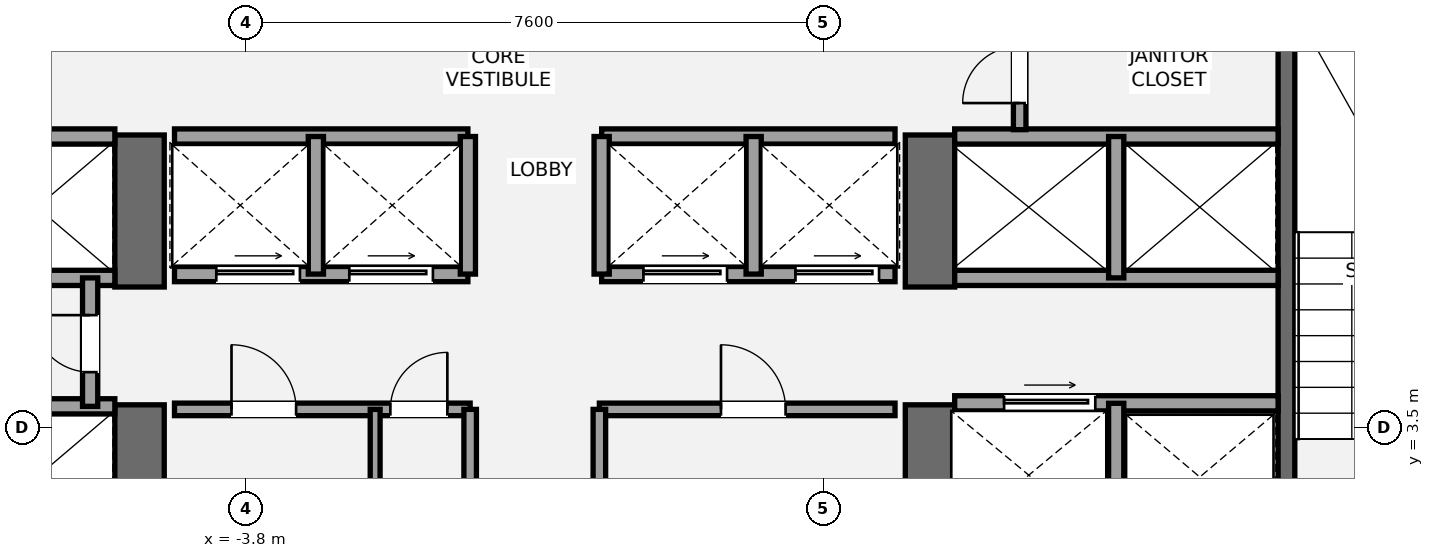
"""IFC4 building model, lengths in metres.
Left out: names, types, materials, properties, quantities, classifications, styles, units other than length and angle.
Written with IfcOpenShell. Run it as: python <this file> out.ifc"""

import sys

from ifc_helpers import new_model, si_unit, direction, frame, frame_2d, origin, place, context, subcontext, project, spatial, rectangle, extrude, element, fill, save


model = new_model("IFC4")
c1 = context("Model", 3, precision=1e-05, world=origin(), true_north=direction((0.0, 1.0)))
c2 = subcontext(c1, "Body", "Model", "MODEL_VIEW")
j1 = project(units=[si_unit("LENGTHUNIT", "METRE"), si_unit("PLANEANGLEUNIT", "RADIAN")], contexts=[c1])
p1 = place(None, origin())
s1 = spatial("IfcSite", under=j1, at=p1, CompositionType="ELEMENT")
p2 = place(p1, origin())
s2 = spatial("IfcBuilding", under=s1, at=p2, CompositionType="ELEMENT")
p3 = place(p2, frame((0.0, 0.0, 185.4)))
s3 = spatial("IfcBuildingStorey", under=s2, at=p3, CompositionType="ELEMENT", Elevation=185.4)
p4 = place(p3, frame((-5.2, 1.2, 0.0), z_axis=(0.0, 0.0, 1.0), x_axis=(0.0, 1.0, 0.0)))
e1 = element("IfcWall", 1, at=p4, inside=s3, PredefinedType="SHEAR", context=c2, shape_type="SweptSolid", body=[
    extrude(rectangle(XDim=2.6, YDim=0.65, at=frame_2d((1.3, 0.0))), origin(), (0.0, 0.0, 1.0), 3.2),
])
p5 = place(p3, frame((-5.2, 5.35, 0.0), z_axis=(0.0, 0.0, 1.0), x_axis=(0.0, 1.0, 0.0)))
e2 = element("IfcWall", 2, at=p5, inside=s3, PredefinedType="SHEAR", context=c2, shape_type="SweptSolid", body=[
    extrude(rectangle(XDim=2.0, YDim=0.65, at=frame_2d((1.0, 0.0))), origin(), (0.0, 0.0, 1.0), 3.2),
])
p6 = place(p3, frame((5.2, 1.2, 0.0), z_axis=(0.0, 0.0, 1.0), x_axis=(0.0, 1.0, 0.0)))
e3 = element("IfcWall", 3, at=p6, inside=s3, PredefinedType="SHEAR", context=c2, shape_type="SweptSolid", body=[
    extrude(rectangle(XDim=2.6, YDim=0.65, at=frame_2d((1.3, 0.0))), origin(), (0.0, 0.0, 1.0), 3.2),
])
p7 = place(p3, frame((5.2, 5.35, 0.0), z_axis=(0.0, 0.0, 1.0), x_axis=(0.0, 1.0, 0.0)))
e4 = element("IfcWall", 4, at=p7, inside=s3, PredefinedType="SHEAR", context=c2, shape_type="SweptSolid", body=[
    extrude(rectangle(XDim=2.0, YDim=0.65, at=frame_2d((1.0, 0.0))), origin(), (0.0, 0.0, 1.0), 3.2),
])
p8 = place(p3, frame((9.89, 1.85, 0.0), z_axis=(0.0, 0.0, 1.0), x_axis=(0.0, 1.0, 0.0)))
e5 = element("IfcWall", 5, at=p8, inside=s3, PredefinedType="SHEAR", context=c2, shape_type="SweptSolid", body=[
    extrude(rectangle(XDim=7.15, YDim=0.22, at=frame_2d((3.575, 0.0))), origin(), (0.0, 0.0, 1.0), 3.2),
])
for number, where, z_axis, x_axis in (
    (6, (-9.78, 3.78, 0.0), (0.0, 0.0, 1.0), (1.0, 0.0, 0.0)),
    (7, (-9.78, 5.47, 0.0), (0.0, 0.0, 1.0), (1.0, 0.0, 0.0)),
    (8, (-9.78, 7.33, 0.0), (0.0, 0.0, 1.0), (1.0, 0.0, 0.0)),
):
    element("IfcWall", number, at=place(p3, frame(where, z_axis=z_axis, x_axis=x_axis)), inside=s3, PredefinedType="SOLIDWALL", context=c2, shape_type="SweptSolid", body=[
        extrude(rectangle(XDim=4.255, YDim=0.2, at=frame_2d((2.127, 0.0))), origin(), (0.0, 0.0, 1.0), 3.02),
    ])
p9 = place(p3, frame((-5.85, 3.78, 0.0), z_axis=(0.0, 0.0, 1.0), x_axis=(0.0, 1.0, 0.0)))
e9 = element("IfcWall", 9, at=p9, inside=s3, PredefinedType="SOLIDWALL", context=c2, shape_type="SweptSolid", body=[
    extrude(rectangle(XDim=1.69, YDim=0.2, at=frame_2d((0.845, 0.0))), origin(), (0.0, 0.0, 1.0), 3.02),
])
p10 = place(p9, frame((0.45, 0.0, 0.0)))
e10 = element("IfcOpeningElement", 10, at=p10, cuts=e9, PredefinedType="OPENING", context=c2, shape_type="SweptSolid", body=[
    extrude(rectangle(XDim=0.75, YDim=2.1, at=frame_2d((0.375, 1.05))), frame((0.0, 0.11, 0.0), z_axis=(0.0, -1.0, 0.0), x_axis=(1.0, 0.0, 0.0)), (0.0, 0.0, 1.0), 0.22),
])
p11 = place(p3, frame((5.525, 3.82, 0.0), z_axis=(0.0, 0.0, 1.0), x_axis=(1.0, 0.0, 0.0)))
e11 = element("IfcWall", 11, at=p11, inside=s3, PredefinedType="SOLIDWALL", context=c2, shape_type="SweptSolid", body=[
    extrude(rectangle(XDim=4.255, YDim=0.2, at=frame_2d((2.127, 0.0))), origin(), (0.0, 0.0, 1.0), 3.02),
])
p12 = place(p11, frame((0.65, 0.0, 0.0)))
e12 = element("IfcOpeningElement", 12, at=p12, cuts=e11, PredefinedType="OPENING", context=c2, shape_type="SweptSolid", body=[
    extrude(rectangle(XDim=1.2, YDim=2.2, at=frame_2d((0.6, 1.1))), frame((0.0, 0.11, 0.0), z_axis=(0.0, -1.0, 0.0), x_axis=(1.0, 0.0, 0.0)), (0.0, 0.0, 1.0), 0.22),
])
p13 = place(p3, frame((7.65, 1.85, 0.0), z_axis=(0.0, 0.0, 1.0), x_axis=(0.0, 1.0, 0.0)))
e13 = element("IfcWall", 13, at=p13, inside=s3, PredefinedType="SOLIDWALL", context=c2, shape_type="SweptSolid", body=[
    extrude(rectangle(XDim=1.97, YDim=0.2, at=frame_2d((0.985, 0.0))), origin(), (0.0, 0.0, 1.0), 3.02),
])
for number, where, z_axis, x_axis in (
    (14, (5.525, 5.47, 0.0), (0.0, 0.0, 1.0), (1.0, 0.0, 0.0)),
    (15, (5.525, 7.33, 0.0), (0.0, 0.0, 1.0), (1.0, 0.0, 0.0)),
):
    element("IfcWall", number, at=place(p3, frame(where, z_axis=z_axis, x_axis=x_axis)), inside=s3, PredefinedType="SOLIDWALL", context=c2, shape_type="SweptSolid", body=[
        extrude(rectangle(XDim=4.255, YDim=0.2, at=frame_2d((2.127, 0.0))), origin(), (0.0, 0.0, 1.0), 3.02),
    ])
p14 = place(p3, frame((7.65, 5.47, 0.0), z_axis=(0.0, 0.0, 1.0), x_axis=(0.0, 1.0, 0.0)))
e16 = element("IfcWall", 16, at=p14, inside=s3, PredefinedType="SOLIDWALL", context=c2, shape_type="SweptSolid", body=[
    extrude(rectangle(XDim=1.86, YDim=0.2, at=frame_2d((0.93, 0.0))), origin(), (0.0, 0.0, 1.0), 3.02),
])
p15 = place(p3, frame((-4.74, 3.74, 0.0), z_axis=(0.0, 0.0, 1.0), x_axis=(1.0, 0.0, 0.0)))
e17 = element("IfcWall", 17, at=p15, inside=s3, PredefinedType="PARTITIONING", context=c2, shape_type="SweptSolid", body=[
    extrude(rectangle(XDim=3.89, YDim=0.165, at=frame_2d((1.945, 0.0))), origin(), (0.0, 0.0, 1.0), 3.02),
])
p16 = place(p15, frame((0.75, 0.0, 0.0)))
e18 = element("IfcOpeningElement", 18, at=p16, cuts=e17, PredefinedType="OPENING", context=c2, shape_type="SweptSolid", body=[
    extrude(rectangle(XDim=0.85, YDim=2.1, at=frame_2d((0.425, 1.05))), frame((0.0, 0.093, 0.0), z_axis=(0.0, -1.0, 0.0), x_axis=(1.0, 0.0, 0.0)), (0.0, 0.0, 1.0), 0.185),
])
p17 = place(p15, frame((2.84, 0.0, 0.0)))
e19 = element("IfcOpeningElement", 19, at=p17, cuts=e17, PredefinedType="OPENING", context=c2, shape_type="SweptSolid", body=[
    extrude(rectangle(XDim=0.75, YDim=2.1, at=frame_2d((0.375, 1.05))), frame((0.0, 0.093, 0.0), z_axis=(0.0, -1.0, 0.0), x_axis=(1.0, 0.0, 0.0)), (0.0, 0.0, 1.0), 0.185),
])
p18 = place(p3, frame((-0.85, 1.92, 0.0), z_axis=(0.0, 0.0, 1.0), x_axis=(0.0, 1.0, 0.0)))
e20 = element("IfcWall", 20, at=p18, inside=s3, PredefinedType="PARTITIONING", context=c2, shape_type="SweptSolid", body=[
    extrude(rectangle(XDim=1.82, YDim=0.165, at=frame_2d((0.91, 0.0))), origin(), (0.0, 0.0, 1.0), 3.02),
])
p19 = place(p3, frame((0.85, 3.74, 0.0), z_axis=(0.0, 0.0, 1.0), x_axis=(1.0, 0.0, 0.0)))
e21 = element("IfcWall", 21, at=p19, inside=s3, PredefinedType="PARTITIONING", context=c2, shape_type="SweptSolid", body=[
    extrude(rectangle(XDim=3.89, YDim=0.165, at=frame_2d((1.945, 0.0))), origin(), (0.0, 0.0, 1.0), 3.02),
])
p20 = place(p19, frame((1.6, 0.0, 0.0)))
e22 = element("IfcOpeningElement", 22, at=p20, cuts=e21, PredefinedType="OPENING", context=c2, shape_type="SweptSolid", body=[
    extrude(rectangle(XDim=0.85, YDim=2.1, at=frame_2d((0.425, 1.05))), frame((0.0, 0.093, 0.0), z_axis=(0.0, -1.0, 0.0), x_axis=(1.0, 0.0, 0.0)), (0.0, 0.0, 1.0), 0.185),
])
p21 = place(p3, frame((0.85, 1.92, 0.0), z_axis=(0.0, 0.0, 1.0), x_axis=(0.0, 1.0, 0.0)))
e23 = element("IfcWall", 23, at=p21, inside=s3, PredefinedType="PARTITIONING", context=c2, shape_type="SweptSolid", body=[
    extrude(rectangle(XDim=1.82, YDim=0.165, at=frame_2d((0.91, 0.0))), origin(), (0.0, 0.0, 1.0), 3.02),
])
p22 = place(p3, frame((-2.1, 1.92, 0.0), z_axis=(0.0, 0.0, 1.0), x_axis=(0.0, 1.0, 0.0)))
e24 = element("IfcWall", 24, at=p22, inside=s3, PredefinedType="PARTITIONING", context=c2, shape_type="SweptSolid", body=[
    extrude(rectangle(XDim=1.82, YDim=0.13, at=frame_2d((0.91, 0.0))), origin(), (0.0, 0.0, 1.0), 3.02),
])
p23 = place(p3, frame((-4.74, 5.52, 0.0), z_axis=(0.0, 0.0, 1.0), x_axis=(1.0, 0.0, 0.0)))
e25 = element("IfcWall", 25, at=p23, inside=s3, PredefinedType="SOLIDWALL", context=c2, shape_type="SweptSolid", body=[
    extrude(rectangle(XDim=3.86, YDim=0.2, at=frame_2d((1.93, 0.0))), origin(), (0.0, 0.0, 1.0), 3.02),
])
p24 = place(p23, frame((0.55, 0.0, 0.0)))
e26 = element("IfcOpeningElement", 26, at=p24, cuts=e25, PredefinedType="OPENING", context=c2, shape_type="SweptSolid", body=[
    extrude(rectangle(XDim=1.1, YDim=2.2, at=frame_2d((0.55, 1.1))), frame((0.0, 0.11, 0.0), z_axis=(0.0, -1.0, 0.0), x_axis=(1.0, 0.0, 0.0)), (0.0, 0.0, 1.0), 0.22),
])
p25 = place(p23, frame((2.3, 0.0, 0.0)))
e27 = element("IfcOpeningElement", 27, at=p25, cuts=e25, PredefinedType="OPENING", context=c2, shape_type="SweptSolid", body=[
    extrude(rectangle(XDim=1.1, YDim=2.2, at=frame_2d((0.55, 1.1))), frame((0.0, 0.11, 0.0), z_axis=(0.0, -1.0, 0.0), x_axis=(1.0, 0.0, 0.0)), (0.0, 0.0, 1.0), 0.22),
])
p26 = place(p3, frame((0.88, 5.52, 0.0), z_axis=(0.0, 0.0, 1.0), x_axis=(1.0, 0.0, 0.0)))
e28 = element("IfcWall", 28, at=p26, inside=s3, PredefinedType="SOLIDWALL", context=c2, shape_type="SweptSolid", body=[
    extrude(rectangle(XDim=3.86, YDim=0.2, at=frame_2d((1.93, 0.0))), origin(), (0.0, 0.0, 1.0), 3.02),
])
p27 = place(p26, frame((0.55, 0.0, 0.0)))
e29 = element("IfcOpeningElement", 29, at=p27, cuts=e28, PredefinedType="OPENING", context=c2, shape_type="SweptSolid", body=[
    extrude(rectangle(XDim=1.1, YDim=2.2, at=frame_2d((0.55, 1.1))), frame((0.0, 0.11, 0.0), z_axis=(0.0, -1.0, 0.0), x_axis=(1.0, 0.0, 0.0)), (0.0, 0.0, 1.0), 0.22),
])
p28 = place(p26, frame((2.55, 0.0, 0.0)))
e30 = element("IfcOpeningElement", 30, at=p28, cuts=e28, PredefinedType="OPENING", context=c2, shape_type="SweptSolid", body=[
    extrude(rectangle(XDim=1.1, YDim=2.2, at=frame_2d((0.55, 1.1))), frame((0.0, 0.11, 0.0), z_axis=(0.0, -1.0, 0.0), x_axis=(1.0, 0.0, 0.0)), (0.0, 0.0, 1.0), 0.22),
])
for number, where, z_axis, x_axis in (
    (31, (-4.74, 7.33, 0.0), (0.0, 0.0, 1.0), (1.0, 0.0, 0.0)),
    (32, (0.88, 7.33, 0.0), (0.0, 0.0, 1.0), (1.0, 0.0, 0.0)),
):
    element("IfcWall", number, at=place(p3, frame(where, z_axis=z_axis, x_axis=x_axis)), inside=s3, PredefinedType="SOLIDWALL", context=c2, shape_type="SweptSolid", body=[
        extrude(rectangle(XDim=3.86, YDim=0.2, at=frame_2d((1.93, 0.0))), origin(), (0.0, 0.0, 1.0), 3.02),
    ])
for number, where, z_axis, x_axis in (
    (33, (-2.88, 5.52, 0.0), (0.0, 0.0, 1.0), (0.0, 1.0, 0.0)),
    (34, (2.88, 5.52, 0.0), (0.0, 0.0, 1.0), (0.0, 1.0, 0.0)),
    (35, (-0.88, 5.52, 0.0), (0.0, 0.0, 1.0), (0.0, 1.0, 0.0)),
    (36, (0.88, 5.52, 0.0), (0.0, 0.0, 1.0), (0.0, 1.0, 0.0)),
):
    element("IfcWall", number, at=place(p3, frame(where, z_axis=z_axis, x_axis=x_axis)), inside=s3, PredefinedType="SOLIDWALL", context=c2, shape_type="SweptSolid", body=[
        extrude(rectangle(XDim=1.81, YDim=0.2, at=frame_2d((0.905, 0.0))), origin(), (0.0, 0.0, 1.0), 3.02),
    ])
p29 = place(p3, frame((6.38, 7.42, 0.0), z_axis=(0.0, 0.0, 1.0), x_axis=(0.0, 1.0, 0.0)))
e37 = element("IfcWall", 37, at=p29, inside=s3, PredefinedType="PARTITIONING", context=c2, shape_type="SweptSolid", body=[
    extrude(rectangle(XDim=1.58, YDim=0.165, at=frame_2d((0.79, 0.0))), origin(), (0.0, 0.0, 1.0), 3.02),
])
p30 = place(p29, frame((0.35, 0.0, 0.0)))
e38 = element("IfcOpeningElement", 38, at=p30, cuts=e37, PredefinedType="OPENING", context=c2, shape_type="SweptSolid", body=[
    extrude(rectangle(XDim=0.75, YDim=2.1, at=frame_2d((0.375, 1.05))), frame((0.0, 0.093, 0.0), z_axis=(0.0, -1.0, 0.0), x_axis=(1.0, 0.0, 0.0)), (0.0, 0.0, 1.0), 0.185),
])
p31 = place(p10, origin())
e39 = element("IfcDoor", 39, at=p31, inside=s3, OperationType="SINGLE_SWING_RIGHT", PredefinedType="DOOR", context=c2, shape_type="SweptSolid", body=[
    extrude(rectangle(XDim=0.75, YDim=2.1, at=frame_2d((0.375, 1.05))), frame((0.0, 0.025, 0.0), z_axis=(0.0, -1.0, 0.0), x_axis=(1.0, 0.0, 0.0)), (0.0, 0.0, 1.0), 0.05),
])
fill(e10, e39)
p32 = place(p12, origin())
e40 = element("IfcDoor", 40, at=p32, inside=s3, OperationType="SLIDING_TO_RIGHT", PredefinedType="DOOR", context=c2, shape_type="SweptSolid", body=[
    extrude(rectangle(XDim=1.2, YDim=2.2, at=frame_2d((0.6, 1.1))), frame((0.0, 0.025, 0.0), z_axis=(0.0, -1.0, 0.0), x_axis=(1.0, 0.0, 0.0)), (0.0, 0.0, 1.0), 0.05),
])
fill(e12, e40)
p33 = place(p16, origin())
e41 = element("IfcDoor", 41, at=p33, inside=s3, OperationType="SINGLE_SWING_LEFT", PredefinedType="DOOR", context=c2, shape_type="SweptSolid", body=[
    extrude(rectangle(XDim=0.85, YDim=2.1, at=frame_2d((0.425, 1.05))), frame((0.0, 0.025, 0.0), z_axis=(0.0, -1.0, 0.0), x_axis=(1.0, 0.0, 0.0)), (0.0, 0.0, 1.0), 0.05),
])
fill(e18, e41)
p34 = place(p17, origin())
e42 = element("IfcDoor", 42, at=p34, inside=s3, OperationType="SINGLE_SWING_RIGHT", PredefinedType="DOOR", context=c2, shape_type="SweptSolid", body=[
    extrude(rectangle(XDim=0.75, YDim=2.1, at=frame_2d((0.375, 1.05))), frame((0.0, 0.025, 0.0), z_axis=(0.0, -1.0, 0.0), x_axis=(1.0, 0.0, 0.0)), (0.0, 0.0, 1.0), 0.05),
])
fill(e19, e42)
p35 = place(p20, origin())
e43 = element("IfcDoor", 43, at=p35, inside=s3, OperationType="SINGLE_SWING_LEFT", PredefinedType="DOOR", context=c2, shape_type="SweptSolid", body=[
    extrude(rectangle(XDim=0.85, YDim=2.1, at=frame_2d((0.425, 1.05))), frame((0.0, 0.025, 0.0), z_axis=(0.0, -1.0, 0.0), x_axis=(1.0, 0.0, 0.0)), (0.0, 0.0, 1.0), 0.05),
])
fill(e22, e43)
p36 = place(p24, origin())
e44 = element("IfcDoor", 44, at=p36, inside=s3, OperationType="SLIDING_TO_LEFT", PredefinedType="DOOR", context=c2, shape_type="SweptSolid", body=[
    extrude(rectangle(XDim=1.1, YDim=2.2, at=frame_2d((0.55, 1.1))), frame((0.0, 0.025, 0.0), z_axis=(0.0, -1.0, 0.0), x_axis=(1.0, 0.0, 0.0)), (0.0, 0.0, 1.0), 0.05),
])
fill(e26, e44)
p37 = place(p25, origin())
e45 = element("IfcDoor", 45, at=p37, inside=s3, OperationType="SLIDING_TO_LEFT", PredefinedType="DOOR", context=c2, shape_type="SweptSolid", body=[
    extrude(rectangle(XDim=1.1, YDim=2.2, at=frame_2d((0.55, 1.1))), frame((0.0, 0.025, 0.0), z_axis=(0.0, -1.0, 0.0), x_axis=(1.0, 0.0, 0.0)), (0.0, 0.0, 1.0), 0.05),
])
fill(e27, e45)
p38 = place(p27, origin())
e46 = element("IfcDoor", 46, at=p38, inside=s3, OperationType="SLIDING_TO_LEFT", PredefinedType="DOOR", context=c2, shape_type="SweptSolid", body=[
    extrude(rectangle(XDim=1.1, YDim=2.2, at=frame_2d((0.55, 1.1))), frame((0.0, 0.025, 0.0), z_axis=(0.0, -1.0, 0.0), x_axis=(1.0, 0.0, 0.0)), (0.0, 0.0, 1.0), 0.05),
])
fill(e29, e46)
p39 = place(p28, origin())
e47 = element("IfcDoor", 47, at=p39, inside=s3, OperationType="SLIDING_TO_LEFT", PredefinedType="DOOR", context=c2, shape_type="SweptSolid", body=[
    extrude(rectangle(XDim=1.1, YDim=2.2, at=frame_2d((0.55, 1.1))), frame((0.0, 0.025, 0.0), z_axis=(0.0, -1.0, 0.0), x_axis=(1.0, 0.0, 0.0)), (0.0, 0.0, 1.0), 0.05),
])
fill(e30, e47)
p40 = place(p30, origin())
e48 = element("IfcDoor", 48, at=p40, inside=s3, OperationType="SINGLE_SWING_LEFT", PredefinedType="DOOR", context=c2, shape_type="SweptSolid", body=[
    extrude(rectangle(XDim=0.75, YDim=2.1, at=frame_2d((0.375, 1.05))), frame((0.0, 0.025, 0.0), z_axis=(0.0, -1.0, 0.0), x_axis=(1.0, 0.0, 0.0)), (0.0, 0.0, 1.0), 0.05),
])
fill(e38, e48)
save(model, sys.argv[1])
